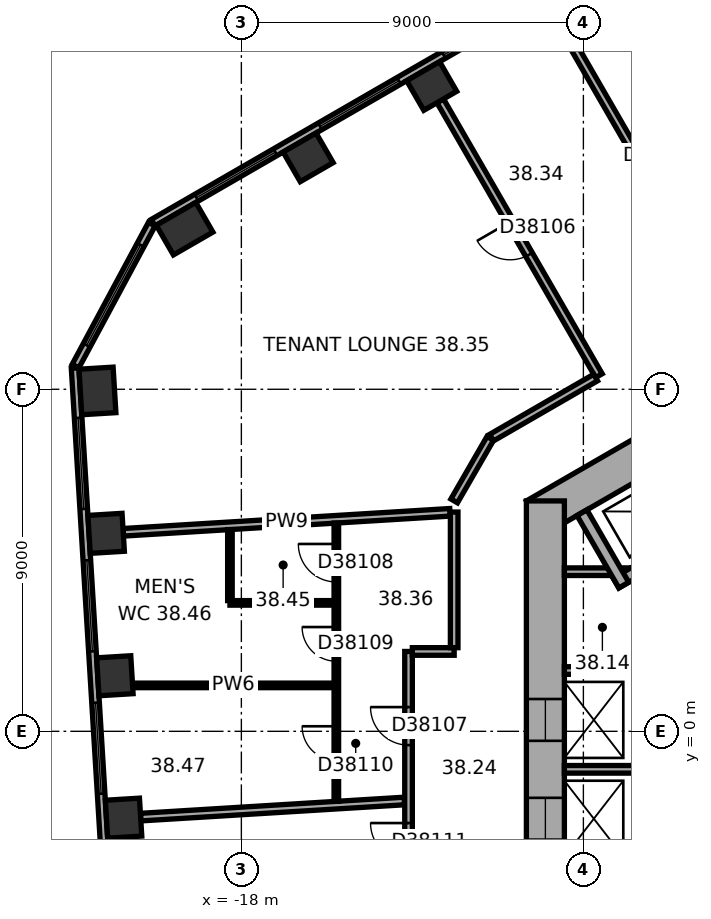
"""IFC4 building model, lengths in metres.
Left out: names, types, materials, properties, quantities, classifications, styles, units other than length and angle.
Written with IfcOpenShell. Run it as: python <this file> out.ifc"""

import sys

from ifc_helpers import new_model, si_unit, direction, frame, frame_2d, origin, origin_2d, place, context, subcontext, project, spatial, rectangle, extrude, element, fill, save


model = new_model("IFC4")
c1 = context("Model", 3, precision=1e-05, world=origin(), true_north=direction((0.0, 1.0)))
c2 = subcontext(c1, "Body", "Model", "MODEL_VIEW")
j1 = project(units=[si_unit("LENGTHUNIT", "METRE"), si_unit("PLANEANGLEUNIT", "RADIAN")], contexts=[c1])
p1 = place(None, origin())
s1 = spatial("IfcSite", under=j1, at=p1, CompositionType="ELEMENT")
p2 = place(p1, origin())
s2 = spatial("IfcBuilding", under=s1, at=p2, CompositionType="ELEMENT")
p3 = place(p2, frame((0.0, 0.0, 157.7)))
s3 = spatial("IfcBuildingStorey", under=s2, at=p3, CompositionType="ELEMENT", Elevation=157.7)
for number, where, z_axis, x_axis in (
    (1, (-12.991, 16.979, 0.0), (0.0, 0.0, 1.0), (-0.866, -0.5, 0.0)),
    (2, (-16.242, 15.102, 0.0), (0.0, 0.0, 1.0), (-0.866, -0.5, 0.0)),
):
    element("IfcColumn", number, at=place(p3, frame(where, z_axis=z_axis, x_axis=x_axis)), inside=s3, PredefinedType="COLUMN", context=c2, shape_type="SweptSolid", body=[
        extrude(rectangle(XDim=1.0, YDim=0.9, at=origin_2d()), origin(), (0.0, 0.0, 1.0), 3.7),
    ])
for number, where, z_axis, x_axis in (
    (3, (-19.494, 13.225, 0.0), (0.0, 0.0, 1.0), (-0.866, -0.5, 0.0)),
    (4, (-21.787, 8.956, 0.0), (0.0, 0.0, 1.0), (0.061, -0.998, 0.0)),
):
    element("IfcColumn", number, at=place(p3, frame(where, z_axis=z_axis, x_axis=x_axis)), inside=s3, PredefinedType="COLUMN", context=c2, shape_type="SweptSolid", body=[
        extrude(rectangle(XDim=1.2, YDim=0.9, at=origin_2d()), origin(), (0.0, 0.0, 1.0), 3.7),
    ])
for number, where, z_axis, x_axis in (
    (5, (-21.558, 5.209, 0.0), (0.0, 0.0, 1.0), (0.061, -0.998, 0.0)),
    (6, (-21.329, 1.462, 0.0), (0.0, 0.0, 1.0), (0.061, -0.998, 0.0)),
    (7, (-21.1, -2.285, 0.0), (0.0, 0.0, 1.0), (0.061, -0.998, 0.0)),
):
    element("IfcColumn", number, at=place(p3, frame(where, z_axis=z_axis, x_axis=x_axis)), inside=s3, PredefinedType="COLUMN", context=c2, shape_type="SweptSolid", body=[
        extrude(rectangle(XDim=1.0, YDim=0.9, at=origin_2d()), origin(), (0.0, 0.0, 1.0), 3.7),
    ])
p4 = place(p3, frame((0.25, 11.691, 0.0), z_axis=(0.0, 0.0, 1.0), x_axis=(-0.866022616891, -0.50000482701, 0.0)))
e8 = element("IfcWall", 8, at=p4, inside=s3, PredefinedType="SHEAR", context=c2, shape_type="SweptSolid", body=[
    extrude(rectangle(XDim=12.125, YDim=1.0, at=frame_2d((6.062, 0.0))), origin(), (0.0, 0.0, 1.0), 3.7),
])
p5 = place(p4, frame((6.262, 0.0, 0.0)))
e9 = element("IfcOpeningElement", 9, at=p5, cuts=e8, PredefinedType="OPENING", context=c2, shape_type="SweptSolid", body=[
    extrude(rectangle(XDim=1.5, YDim=2.1, at=frame_2d((0.75, 1.05))), frame((0.0, 0.51, 0.0), z_axis=(0.0, -1.0, 0.0), x_axis=(1.0, 0.0, 0.0)), (0.0, 0.0, 1.0), 1.02),
])
p6 = place(p4, frame((3.112, 0.0, 0.0)))
e10 = element("IfcOpeningElement", 10, at=p6, cuts=e8, PredefinedType="OPENING", context=c2, shape_type="SweptSolid", body=[
    extrude(rectangle(XDim=0.9, YDim=2.1, at=frame_2d((0.45, 1.05))), frame((0.0, 0.51, 0.0), z_axis=(0.0, -1.0, 0.0), x_axis=(1.0, 0.0, 0.0)), (0.0, 0.0, 1.0), 1.02),
])
p7 = place(p3, frame((-10.0, 6.062, 0.0), z_axis=(0.0, 0.0, 1.0), x_axis=(0.0, -1.0, 0.0)))
e11 = element("IfcWall", 11, at=p7, inside=s3, PredefinedType="SHEAR", context=c2, shape_type="SweptSolid", body=[
    extrude(rectangle(XDim=12.125, YDim=1.0, at=frame_2d((6.062, 0.0))), origin(), (0.0, 0.0, 1.0), 3.7),
])
p8 = place(p7, frame((5.212, 0.0, 0.0)))
e12 = element("IfcOpeningElement", 12, at=p8, cuts=e11, PredefinedType="OPENING", context=c2, shape_type="SweptSolid", body=[
    extrude(rectangle(XDim=1.1, YDim=2.1, at=frame_2d((0.55, 1.05))), frame((0.0, 0.51, 0.0), z_axis=(0.0, -1.0, 0.0), x_axis=(1.0, 0.0, 0.0)), (0.0, 0.0, 1.0), 1.02),
])
p9 = place(p7, frame((7.812, 0.0, 0.0)))
e13 = element("IfcOpeningElement", 13, at=p9, cuts=e11, PredefinedType="OPENING", context=c2, shape_type="SweptSolid", body=[
    extrude(rectangle(XDim=1.1, YDim=2.1, at=frame_2d((0.55, 1.05))), frame((0.0, 0.51, 0.0), z_axis=(0.0, -1.0, 0.0), x_axis=(1.0, 0.0, 0.0)), (0.0, 0.0, 1.0), 1.02),
])
p10 = place(p3, frame((-2.961, 23.405, 0.0), z_axis=(0.0, 0.0, 1.0), x_axis=(-0.866023315909, -0.500003616288, 0.0)))
e14 = element("IfcWall", 14, at=p10, inside=s3, PredefinedType="STANDARD", context=c2, shape_type="SweptSolid", body=[
    extrude(rectangle(XDim=20.044, YDim=0.2, at=frame_2d((10.022, 0.0))), origin(), (0.0, 0.0, 1.0), 3.7),
])
p11 = place(p10, frame((1.314, 0.0, 0.9)))
e15 = element("IfcOpeningElement", 15, at=p11, cuts=e14, PredefinedType="OPENING", context=c2, shape_type="SweptSolid", body=[
    extrude(rectangle(XDim=2.4, YDim=2.0, at=frame_2d((1.2, 1.0))), frame((0.0, 0.11, 0.0), z_axis=(0.0, -1.0, 0.0), x_axis=(1.0, 0.0, 0.0)), (0.0, 0.0, 1.0), 0.22),
])
p12 = place(p10, frame((5.069, 0.0, 0.9)))
e16 = element("IfcOpeningElement", 16, at=p12, cuts=e14, PredefinedType="OPENING", context=c2, shape_type="SweptSolid", body=[
    extrude(rectangle(XDim=2.4, YDim=2.0, at=frame_2d((1.2, 1.0))), frame((0.0, 0.11, 0.0), z_axis=(0.0, -1.0, 0.0), x_axis=(1.0, 0.0, 0.0)), (0.0, 0.0, 1.0), 0.22),
])
p13 = place(p10, frame((8.823, 0.0, 0.9)))
e17 = element("IfcOpeningElement", 17, at=p13, cuts=e14, PredefinedType="OPENING", context=c2, shape_type="SweptSolid", body=[
    extrude(rectangle(XDim=2.4, YDim=2.0, at=frame_2d((1.2, 1.0))), frame((0.0, 0.11, 0.0), z_axis=(0.0, -1.0, 0.0), x_axis=(1.0, 0.0, 0.0)), (0.0, 0.0, 1.0), 0.22),
])
p14 = place(p10, frame((12.577, 0.0, 0.9)))
e18 = element("IfcOpeningElement", 18, at=p14, cuts=e14, PredefinedType="OPENING", context=c2, shape_type="SweptSolid", body=[
    extrude(rectangle(XDim=2.4, YDim=2.0, at=frame_2d((1.2, 1.0))), frame((0.0, 0.11, 0.0), z_axis=(0.0, -1.0, 0.0), x_axis=(1.0, 0.0, 0.0)), (0.0, 0.0, 1.0), 0.22),
])
p15 = place(p10, frame((16.331, 0.0, 0.9)))
e19 = element("IfcOpeningElement", 19, at=p15, cuts=e14, PredefinedType="OPENING", context=c2, shape_type="SweptSolid", body=[
    extrude(rectangle(XDim=2.4, YDim=2.0, at=frame_2d((1.2, 1.0))), frame((0.0, 0.11, 0.0), z_axis=(0.0, -1.0, 0.0), x_axis=(1.0, 0.0, 0.0)), (0.0, 0.0, 1.0), 0.22),
])
p16 = place(p3, frame((-20.357, 13.344, 0.0), z_axis=(0.0, 0.0, 1.0), x_axis=(-0.473288913494, -0.880907262068, 0.0)))
e20 = element("IfcWall", 20, at=p16, inside=s3, PredefinedType="STANDARD", context=c2, shape_type="SweptSolid", body=[
    extrude(rectangle(XDim=4.238, YDim=0.2, at=frame_2d((2.119, 0.0))), origin(), (0.0, 0.0, 1.0), 3.7),
])
p17 = place(p16, frame((0.619, 0.0, 0.9)))
e21 = element("IfcOpeningElement", 21, at=p17, cuts=e20, PredefinedType="OPENING", context=c2, shape_type="SweptSolid", body=[
    extrude(rectangle(XDim=3.0, YDim=2.0, at=frame_2d((1.5, 1.0))), frame((0.0, 0.11, 0.0), z_axis=(0.0, -1.0, 0.0), x_axis=(1.0, 0.0, 0.0)), (0.0, 0.0, 1.0), 0.22),
])
p18 = place(p3, frame((-22.375, 9.557, 0.0), z_axis=(0.0, 0.0, 1.0), x_axis=(0.061036015339, -0.998135564356, 0.0)))
e22 = element("IfcWall", 22, at=p18, inside=s3, PredefinedType="STANDARD", context=c2, shape_type="SweptSolid", body=[
    extrude(rectangle(XDim=20.044, YDim=0.2, at=frame_2d((10.022, 0.0))), origin(), (0.0, 0.0, 1.0), 3.7),
])
p19 = place(p18, frame((1.313, 0.0, 0.9)))
e23 = element("IfcOpeningElement", 23, at=p19, cuts=e22, PredefinedType="OPENING", context=c2, shape_type="SweptSolid", body=[
    extrude(rectangle(XDim=2.4, YDim=2.0, at=frame_2d((1.2, 1.0))), frame((0.0, 0.11, 0.0), z_axis=(0.0, -1.0, 0.0), x_axis=(1.0, 0.0, 0.0)), (0.0, 0.0, 1.0), 0.22),
])
p20 = place(p18, frame((5.067, 0.0, 0.9)))
e24 = element("IfcOpeningElement", 24, at=p20, cuts=e22, PredefinedType="OPENING", context=c2, shape_type="SweptSolid", body=[
    extrude(rectangle(XDim=2.4, YDim=2.0, at=frame_2d((1.2, 1.0))), frame((0.0, 0.11, 0.0), z_axis=(0.0, -1.0, 0.0), x_axis=(1.0, 0.0, 0.0)), (0.0, 0.0, 1.0), 0.22),
])
p21 = place(p18, frame((8.821, 0.0, 0.9)))
e25 = element("IfcOpeningElement", 25, at=p21, cuts=e22, PredefinedType="OPENING", context=c2, shape_type="SweptSolid", body=[
    extrude(rectangle(XDim=2.4, YDim=2.0, at=frame_2d((1.2, 1.0))), frame((0.0, 0.11, 0.0), z_axis=(0.0, -1.0, 0.0), x_axis=(1.0, 0.0, 0.0)), (0.0, 0.0, 1.0), 0.22),
])
p22 = place(p18, frame((12.575, 0.0, 0.9)))
e26 = element("IfcOpeningElement", 26, at=p22, cuts=e22, PredefinedType="OPENING", context=c2, shape_type="SweptSolid", body=[
    extrude(rectangle(XDim=2.4, YDim=2.0, at=frame_2d((1.2, 1.0))), frame((0.0, 0.11, 0.0), z_axis=(0.0, -1.0, 0.0), x_axis=(1.0, 0.0, 0.0)), (0.0, 0.0, 1.0), 0.22),
])
p23 = place(p18, frame((16.329, 0.0, 0.9)))
e27 = element("IfcOpeningElement", 27, at=p23, cuts=e22, PredefinedType="OPENING", context=c2, shape_type="SweptSolid", body=[
    extrude(rectangle(XDim=2.4, YDim=2.0, at=frame_2d((1.2, 1.0))), frame((0.0, 0.11, 0.0), z_axis=(0.0, -1.0, 0.0), x_axis=(1.0, 0.0, 0.0)), (0.0, 0.0, 1.0), 0.22),
])
for number, where, z_axis, x_axis in (
    (28, (-7.3, 4.2, 0.0), (0.0, 0.0, 1.0), (-1.0, 0.0, 0.0)),
    (29, (-7.3, 1.6, 0.0), (0.0, 0.0, 1.0), (-1.0, 0.0, 0.0)),
    (30, (-7.3, -1.0, 0.0), (0.0, 0.0, 1.0), (-1.0, 0.0, 0.0)),
):
    element("IfcWall", number, at=place(p3, frame(where, z_axis=z_axis, x_axis=x_axis)), inside=s3, PredefinedType="PARTITIONING", context=c2, shape_type="SweptSolid", body=[
        extrude(rectangle(XDim=2.2, YDim=0.2, at=frame_2d((1.1, 0.0))), origin(), (0.0, 0.0, 1.0), 3.42),
    ])
p24 = place(p3, frame((-5.24, 5.577, 0.0), z_axis=(0.0, 0.0, 1.0), x_axis=(-0.866014461049, -0.500018952895, 0.0)))
e31 = element("IfcWall", 31, at=p24, inside=s3, PredefinedType="SHEAR", context=c2, shape_type="SweptSolid", body=[
    extrude(rectangle(XDim=3.35, YDim=0.3, at=frame_2d((1.675, 0.0))), origin(), (0.0, 0.0, 1.0), 3.42),
])
p25 = place(p3, frame((-7.937, 3.847, 0.0), z_axis=(0.0, 0.0, 1.0), x_axis=(-0.50002983664, 0.866008176907, 0.0)))
e32 = element("IfcWall", 32, at=p25, inside=s3, PredefinedType="SHEAR", context=c2, shape_type="SweptSolid", body=[
    extrude(rectangle(XDim=2.2, YDim=0.3, at=frame_2d((1.1, 0.0))), origin(), (0.0, 0.0, 1.0), 3.42),
])
p26 = place(p3, frame((-21.109, 5.237, 0.0), z_axis=(0.0, 0.0, 1.0), x_axis=(0.998135264293, 0.061040922131, 0.0)))
e33 = element("IfcWall", 33, at=p26, inside=s3, PredefinedType="PARTITIONING", context=c2, shape_type="SweptSolid", body=[
    extrude(rectangle(XDim=8.615, YDim=0.2, at=frame_2d((4.308, 0.0))), origin(), (0.0, 0.0, 1.0), 3.42),
])
p27 = place(p3, frame((-20.863, 1.208, 0.0), z_axis=(0.0, 0.0, 1.0), x_axis=(1.0, 0.0, 0.0)))
e34 = element("IfcWall", 34, at=p27, inside=s3, PredefinedType="PARTITIONING", context=c2, shape_type="SweptSolid", body=[
    extrude(rectangle(XDim=5.302, YDim=0.12, at=frame_2d((2.651, 0.0))), origin(), (0.0, 0.0, 1.0), 2.87),
])
p28 = place(p3, frame((-20.651, -2.258, 0.0), z_axis=(0.0, 0.0, 1.0), x_axis=(0.998133960965, 0.061062230286, 0.0)))
e35 = element("IfcWall", 35, at=p28, inside=s3, PredefinedType="PARTITIONING", context=c2, shape_type="SweptSolid", body=[
    extrude(rectangle(XDim=6.953, YDim=0.2, at=frame_2d((3.477, 0.0))), origin(), (0.0, 0.0, 1.0), 3.42),
])
p29 = place(p3, frame((-18.301, 3.38, 0.0), z_axis=(0.0, 0.0, 1.0), x_axis=(1.0, 0.0, 0.0)))
e36 = element("IfcWall", 36, at=p29, inside=s3, PredefinedType="PARTITIONING", context=c2, shape_type="SweptSolid", body=[
    extrude(rectangle(XDim=2.74, YDim=0.12, at=frame_2d((1.37, 0.0))), origin(), (0.0, 0.0, 1.0), 3.42),
])
p30 = place(p3, frame((-18.301, 5.308, 0.0), z_axis=(0.0, 0.0, 1.0), x_axis=(0.0, -1.0, 0.0)))
e37 = element("IfcWall", 37, at=p30, inside=s3, PredefinedType="PARTITIONING", context=c2, shape_type="SweptSolid", body=[
    extrude(rectangle(XDim=1.869, YDim=0.12, at=frame_2d((0.934, 0.0))), origin(), (0.0, 0.0, 1.0), 3.42),
])
p31 = place(p3, frame((-15.501, 5.479, 0.0), z_axis=(0.0, 0.0, 1.0), x_axis=(0.0, -1.0, 0.0)))
e38 = element("IfcWall", 38, at=p31, inside=s3, PredefinedType="PARTITIONING", context=c2, shape_type="SweptSolid", body=[
    extrude(rectangle(XDim=7.322, YDim=0.12, at=frame_2d((3.661, 0.0))), origin(), (0.0, 0.0, 1.0), 3.42),
])
p32 = place(p31, frame((0.55, 0.0, 0.0)))
e39 = element("IfcOpeningElement", 39, at=p32, cuts=e38, PredefinedType="OPENING", context=c2, shape_type="SweptSolid", body=[
    extrude(rectangle(XDim=1.0, YDim=2.1, at=frame_2d((0.5, 1.05))), frame((0.0, 0.07, 0.0), z_axis=(0.0, -1.0, 0.0), x_axis=(1.0, 0.0, 0.0)), (0.0, 0.0, 1.0), 0.14),
])
p33 = place(p31, frame((2.736, 0.0, 0.0)))
e40 = element("IfcOpeningElement", 40, at=p33, cuts=e38, PredefinedType="OPENING", context=c2, shape_type="SweptSolid", body=[
    extrude(rectangle(XDim=0.9, YDim=2.1, at=frame_2d((0.45, 1.05))), frame((0.0, 0.07, 0.0), z_axis=(0.0, -1.0, 0.0), x_axis=(1.0, 0.0, 0.0)), (0.0, 0.0, 1.0), 0.14),
])
p34 = place(p31, frame((5.347, 0.0, 0.0)))
e41 = element("IfcOpeningElement", 41, at=p34, cuts=e38, PredefinedType="OPENING", context=c2, shape_type="SweptSolid", body=[
    extrude(rectangle(XDim=0.9, YDim=2.1, at=frame_2d((0.45, 1.05))), frame((0.0, 0.07, 0.0), z_axis=(0.0, -1.0, 0.0), x_axis=(1.0, 0.0, 0.0)), (0.0, 0.0, 1.0), 0.14),
])
p35 = place(p3, frame((-13.601, 2.101, 0.0), z_axis=(0.0, 0.0, 1.0), x_axis=(0.0, -1.0, 0.0)))
e42 = element("IfcWall", 42, at=p35, inside=s3, PredefinedType="PARTITIONING", context=c2, shape_type="SweptSolid", body=[
    extrude(rectangle(XDim=6.102, YDim=0.2, at=frame_2d((3.051, 0.0))), origin(), (0.0, 0.0, 1.0), 3.42),
])
p36 = place(p35, frame((1.464, 0.0, 0.0)))
e43 = element("IfcOpeningElement", 43, at=p36, cuts=e42, PredefinedType="OPENING", context=c2, shape_type="SweptSolid", body=[
    extrude(rectangle(XDim=1.0, YDim=2.1, at=frame_2d((0.5, 1.05))), frame((0.0, 0.11, 0.0), z_axis=(0.0, -1.0, 0.0), x_axis=(1.0, 0.0, 0.0)), (0.0, 0.0, 1.0), 0.22),
])
p37 = place(p35, frame((4.515, 0.0, 0.0)))
e44 = element("IfcOpeningElement", 44, at=p37, cuts=e42, PredefinedType="OPENING", context=c2, shape_type="SweptSolid", body=[
    extrude(rectangle(XDim=1.0, YDim=2.1, at=frame_2d((0.5, 1.05))), frame((0.0, 0.11, 0.0), z_axis=(0.0, -1.0, 0.0), x_axis=(1.0, 0.0, 0.0)), (0.0, 0.0, 1.0), 0.22),
])
p38 = place(p3, frame((-12.766, 16.589, 0.0), z_axis=(0.0, 0.0, 1.0), x_axis=(0.500010139422, -0.866019549707, 0.0)))
e45 = element("IfcWall", 45, at=p38, inside=s3, PredefinedType="PARTITIONING", context=c2, shape_type="SweptSolid", body=[
    extrude(rectangle(XDim=8.35, YDim=0.2, at=frame_2d((4.175, 0.0))), origin(), (0.0, 0.0, 1.0), 3.42),
])
p39 = place(p38, frame((3.675, 0.0, 0.0)))
e46 = element("IfcOpeningElement", 46, at=p39, cuts=e45, PredefinedType="OPENING", context=c2, shape_type="SweptSolid", body=[
    extrude(rectangle(XDim=1.0, YDim=2.1, at=frame_2d((0.5, 1.05))), frame((0.0, 0.11, 0.0), z_axis=(0.0, -1.0, 0.0), x_axis=(1.0, 0.0, 0.0)), (0.0, 0.0, 1.0), 0.22),
])
p40 = place(p3, frame((-12.4, 2.101, 0.0), z_axis=(0.0, 0.0, 1.0), x_axis=(-1.0, 0.0, 0.0)))
e47 = element("IfcWall", 47, at=p40, inside=s3, PredefinedType="PARTITIONING", context=c2, shape_type="SweptSolid", body=[
    extrude(rectangle(XDim=1.101, YDim=0.2, at=frame_2d((0.551, 0.0))), origin(), (0.0, 0.0, 1.0), 3.42),
])
p41 = place(p3, frame((-12.4, 5.769, 0.0), z_axis=(0.0, 0.0, 1.0), x_axis=(0.0, -1.0, 0.0)))
e48 = element("IfcWall", 48, at=p41, inside=s3, PredefinedType="PARTITIONING", context=c2, shape_type="SweptSolid", body=[
    extrude(rectangle(XDim=3.568, YDim=0.2, at=frame_2d((1.784, 0.0))), origin(), (0.0, 0.0, 1.0), 3.42),
])
p42 = place(p3, frame((-11.45, 7.708, 0.0), z_axis=(0.0, 0.0, 1.0), x_axis=(-0.500022797313, -0.86601224135, 0.0)))
e49 = element("IfcWall", 49, at=p42, inside=s3, PredefinedType="PARTITIONING", context=c2, shape_type="SweptSolid", body=[
    extrude(rectangle(XDim=1.9, YDim=0.2, at=frame_2d((0.95, 0.0))), origin(), (0.0, 0.0, 1.0), 3.42),
])
p43 = place(p3, frame((-9.515, 18.466, 0.0), z_axis=(0.0, 0.0, 1.0), x_axis=(0.500010139422, -0.866019549707, 0.0)))
e50 = element("IfcWall", 50, at=p43, inside=s3, PredefinedType="PARTITIONING", context=c2, shape_type="SweptSolid", body=[
    extrude(rectangle(XDim=8.35, YDim=0.2, at=frame_2d((4.175, 0.0))), origin(), (0.0, 0.0, 1.0), 2.87),
])
p44 = place(p43, frame((3.675, 0.0, 0.0)))
e51 = element("IfcOpeningElement", 51, at=p44, cuts=e50, PredefinedType="OPENING", context=c2, shape_type="SweptSolid", body=[
    extrude(rectangle(XDim=1.0, YDim=2.1, at=frame_2d((0.5, 1.05))), frame((0.0, 0.11, 0.0), z_axis=(0.0, -1.0, 0.0), x_axis=(1.0, 0.0, 0.0)), (0.0, 0.0, 1.0), 0.22),
])
p45 = place(p3, frame((-8.678, 9.308, 0.0), z_axis=(0.0, 0.0, 1.0), x_axis=(-0.866000359435, -0.500043375578, 0.0)))
e52 = element("IfcWall", 52, at=p45, inside=s3, PredefinedType="PARTITIONING", context=c2, shape_type="SweptSolid", body=[
    extrude(rectangle(XDim=3.161, YDim=0.2, at=frame_2d((1.581, 0.0))), origin(), (0.0, 0.0, 1.0), 3.42),
])
p46 = place(p13, origin())
e53 = element("IfcWindow", 53, at=p46, inside=s3, PartitioningType="SINGLE_PANEL", PredefinedType="WINDOW", context=c2, shape_type="SweptSolid", body=[
    extrude(rectangle(XDim=2.4, YDim=2.0, at=frame_2d((1.2, 1.0))), frame((0.0, 0.03, 0.0), z_axis=(0.0, -1.0, 0.0), x_axis=(1.0, 0.0, 0.0)), (0.0, 0.0, 1.0), 0.06),
])
fill(e17, e53)
p47 = place(p14, origin())
e54 = element("IfcWindow", 54, at=p47, inside=s3, PartitioningType="SINGLE_PANEL", PredefinedType="WINDOW", context=c2, shape_type="SweptSolid", body=[
    extrude(rectangle(XDim=2.4, YDim=2.0, at=frame_2d((1.2, 1.0))), frame((0.0, 0.03, 0.0), z_axis=(0.0, -1.0, 0.0), x_axis=(1.0, 0.0, 0.0)), (0.0, 0.0, 1.0), 0.06),
])
fill(e18, e54)
p48 = place(p15, origin())
e55 = element("IfcWindow", 55, at=p48, inside=s3, PartitioningType="SINGLE_PANEL", PredefinedType="WINDOW", context=c2, shape_type="SweptSolid", body=[
    extrude(rectangle(XDim=2.4, YDim=2.0, at=frame_2d((1.2, 1.0))), frame((0.0, 0.03, 0.0), z_axis=(0.0, -1.0, 0.0), x_axis=(1.0, 0.0, 0.0)), (0.0, 0.0, 1.0), 0.06),
])
fill(e19, e55)
p49 = place(p17, origin())
e56 = element("IfcWindow", 56, at=p49, inside=s3, PartitioningType="SINGLE_PANEL", PredefinedType="WINDOW", context=c2, shape_type="SweptSolid", body=[
    extrude(rectangle(XDim=3.0, YDim=2.0, at=frame_2d((1.5, 1.0))), frame((0.0, 0.03, 0.0), z_axis=(0.0, -1.0, 0.0), x_axis=(1.0, 0.0, 0.0)), (0.0, 0.0, 1.0), 0.06),
])
fill(e21, e56)
p50 = place(p19, origin())
e57 = element("IfcWindow", 57, at=p50, inside=s3, PartitioningType="SINGLE_PANEL", PredefinedType="WINDOW", context=c2, shape_type="SweptSolid", body=[
    extrude(rectangle(XDim=2.4, YDim=2.0, at=frame_2d((1.2, 1.0))), frame((0.0, 0.03, 0.0), z_axis=(0.0, -1.0, 0.0), x_axis=(1.0, 0.0, 0.0)), (0.0, 0.0, 1.0), 0.06),
])
fill(e23, e57)
p51 = place(p20, origin())
e58 = element("IfcWindow", 58, at=p51, inside=s3, PartitioningType="SINGLE_PANEL", PredefinedType="WINDOW", context=c2, shape_type="SweptSolid", body=[
    extrude(rectangle(XDim=2.4, YDim=2.0, at=frame_2d((1.2, 1.0))), frame((0.0, 0.03, 0.0), z_axis=(0.0, -1.0, 0.0), x_axis=(1.0, 0.0, 0.0)), (0.0, 0.0, 1.0), 0.06),
])
fill(e24, e58)
p52 = place(p21, origin())
e59 = element("IfcWindow", 59, at=p52, inside=s3, PartitioningType="SINGLE_PANEL", PredefinedType="WINDOW", context=c2, shape_type="SweptSolid", body=[
    extrude(rectangle(XDim=2.4, YDim=2.0, at=frame_2d((1.2, 1.0))), frame((0.0, 0.03, 0.0), z_axis=(0.0, -1.0, 0.0), x_axis=(1.0, 0.0, 0.0)), (0.0, 0.0, 1.0), 0.06),
])
fill(e25, e59)
p53 = place(p8, origin())
e60 = element("IfcDoor", 60, at=p53, inside=s3, OperationType="DOUBLE_DOOR_SLIDING", PredefinedType="DOOR", context=c2, shape_type="SweptSolid", body=[
    extrude(rectangle(XDim=1.1, YDim=2.1, at=frame_2d((0.55, 1.05))), frame((0.0, 0.025, 0.0), z_axis=(0.0, -1.0, 0.0), x_axis=(1.0, 0.0, 0.0)), (0.0, 0.0, 1.0), 0.05),
])
fill(e12, e60)
p54 = place(p9, origin())
e61 = element("IfcDoor", 61, at=p54, inside=s3, OperationType="DOUBLE_DOOR_SLIDING", PredefinedType="DOOR", context=c2, shape_type="SweptSolid", body=[
    extrude(rectangle(XDim=1.1, YDim=2.1, at=frame_2d((0.55, 1.05))), frame((0.0, 0.025, 0.0), z_axis=(0.0, -1.0, 0.0), x_axis=(1.0, 0.0, 0.0)), (0.0, 0.0, 1.0), 0.05),
])
fill(e13, e61)
p55 = place(p39, origin())
e62 = element("IfcDoor", 62, at=p55, inside=s3, OperationType="SINGLE_SWING_LEFT", PredefinedType="DOOR", context=c2, shape_type="SweptSolid", body=[
    extrude(rectangle(XDim=1.0, YDim=2.1, at=frame_2d((0.5, 1.05))), frame((0.0, 0.025, 0.0), z_axis=(0.0, -1.0, 0.0), x_axis=(1.0, 0.0, 0.0)), (0.0, 0.0, 1.0), 0.05),
])
fill(e46, e62)
p56 = place(p36, origin())
e63 = element("IfcDoor", 63, at=p56, inside=s3, OperationType="SINGLE_SWING_LEFT", PredefinedType="DOOR", context=c2, shape_type="SweptSolid", body=[
    extrude(rectangle(XDim=1.0, YDim=2.1, at=frame_2d((0.5, 1.05))), frame((0.0, 0.025, 0.0), z_axis=(0.0, -1.0, 0.0), x_axis=(1.0, 0.0, 0.0)), (0.0, 0.0, 1.0), 0.05),
])
fill(e43, e63)
p57 = place(p32, origin())
e64 = element("IfcDoor", 64, at=p57, inside=s3, OperationType="SINGLE_SWING_LEFT", PredefinedType="DOOR", context=c2, shape_type="SweptSolid", body=[
    extrude(rectangle(XDim=1.0, YDim=2.1, at=frame_2d((0.5, 1.05))), frame((0.0, 0.025, 0.0), z_axis=(0.0, -1.0, 0.0), x_axis=(1.0, 0.0, 0.0)), (0.0, 0.0, 1.0), 0.05),
])
fill(e39, e64)
p58 = place(p33, origin())
e65 = element("IfcDoor", 65, at=p58, inside=s3, OperationType="SINGLE_SWING_LEFT", PredefinedType="DOOR", context=c2, shape_type="SweptSolid", body=[
    extrude(rectangle(XDim=0.9, YDim=2.1, at=frame_2d((0.45, 1.05))), frame((0.0, 0.025, 0.0), z_axis=(0.0, -1.0, 0.0), x_axis=(1.0, 0.0, 0.0)), (0.0, 0.0, 1.0), 0.05),
])
fill(e40, e65)
p59 = place(p34, origin())
e66 = element("IfcDoor", 66, at=p59, inside=s3, OperationType="SINGLE_SWING_LEFT", PredefinedType="DOOR", context=c2, shape_type="SweptSolid", body=[
    extrude(rectangle(XDim=0.9, YDim=2.1, at=frame_2d((0.45, 1.05))), frame((0.0, 0.025, 0.0), z_axis=(0.0, -1.0, 0.0), x_axis=(1.0, 0.0, 0.0)), (0.0, 0.0, 1.0), 0.05),
])
fill(e41, e66)
p60 = place(p37, origin())
e67 = element("IfcDoor", 67, at=p60, inside=s3, OperationType="SINGLE_SWING_LEFT", PredefinedType="DOOR", context=c2, shape_type="SweptSolid", body=[
    extrude(rectangle(XDim=1.0, YDim=2.1, at=frame_2d((0.5, 1.05))), frame((0.0, 0.025, 0.0), z_axis=(0.0, -1.0, 0.0), x_axis=(1.0, 0.0, 0.0)), (0.0, 0.0, 1.0), 0.05),
])
fill(e44, e67)
save(model, sys.argv[1])
